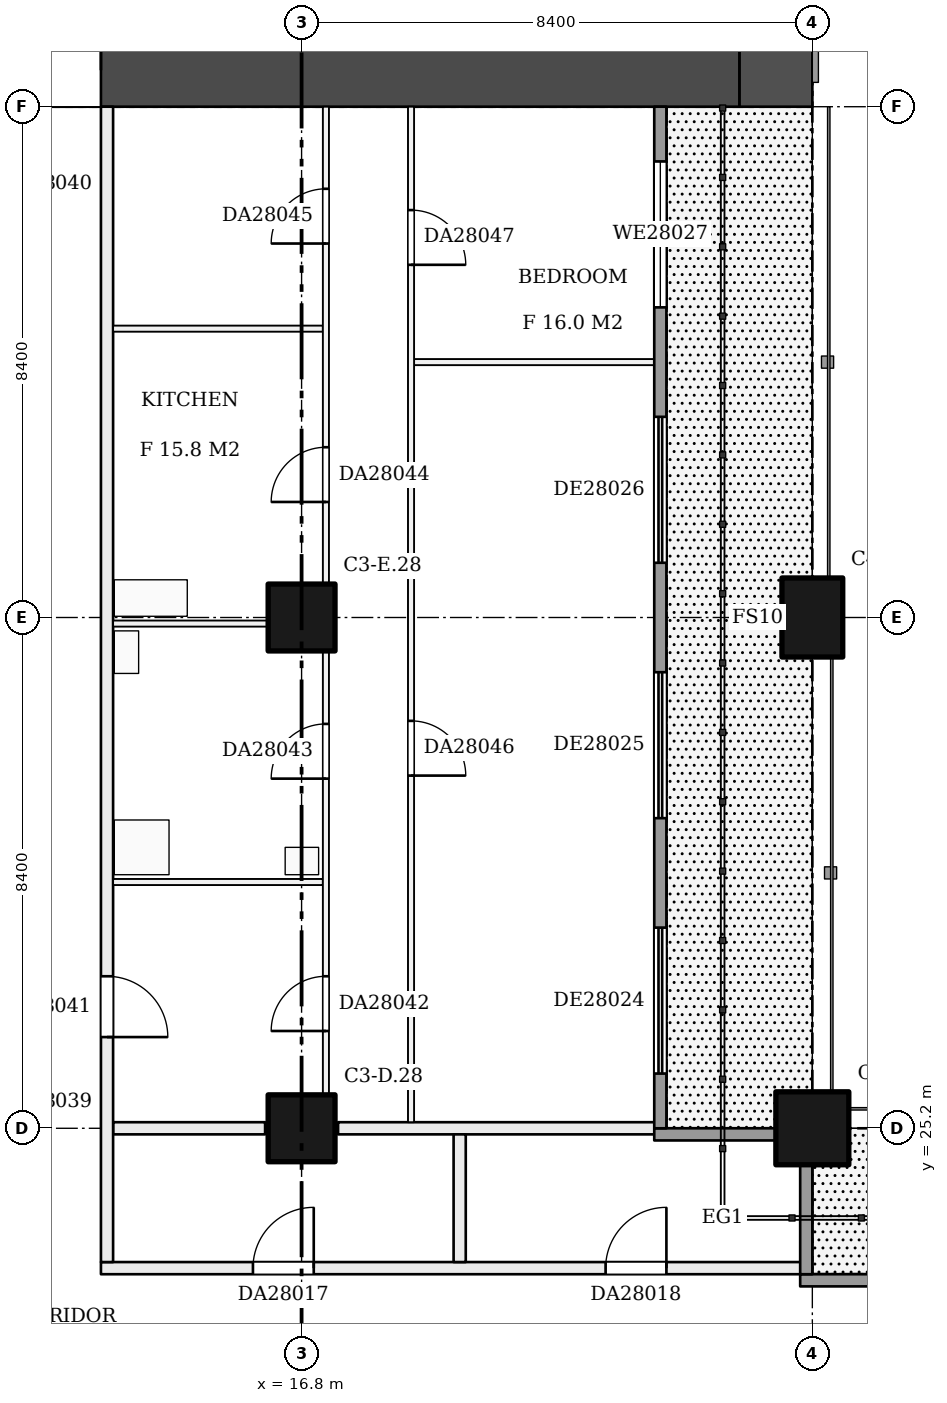
"""IFC4 building model, lengths in metres.
Left out: names, types, materials, properties, quantities, classifications, styles, units other than length and angle.
Written with IfcOpenShell. Run it as: python <this file> out.ifc"""

import sys

from ifc_helpers import new_model, si_unit, direction, frame, frame_2d, origin, origin_2d, place, context, subcontext, project, spatial, rectangle, extrude, element, fill, save


model = new_model("IFC4")
c1 = context("Model", 3, precision=1e-05, world=origin(), true_north=direction((0.0, 1.0)))
c2 = subcontext(c1, "Body", "Model", "MODEL_VIEW")
j1 = project(units=[si_unit("LENGTHUNIT", "METRE"), si_unit("PLANEANGLEUNIT", "RADIAN")], contexts=[c1])
p1 = place(None, origin())
s1 = spatial("IfcSite", under=j1, at=p1, CompositionType="ELEMENT")
p2 = place(p1, origin())
s2 = spatial("IfcBuilding", under=s1, at=p2, CompositionType="ELEMENT")
p3 = place(p2, frame((0.0, 0.0, 112.7)))
s3 = spatial("IfcBuildingStorey", under=s2, at=p3, CompositionType="ELEMENT", Elevation=112.7)
for number, where, z_axis, x_axis in (
    (1, (16.8, 25.2, 0.0), (0.0, 0.0, 1.0), (1.0, 0.0, 0.0)),
    (2, (16.8, 33.6, 0.0), (0.0, 0.0, 1.0), (1.0, 0.0, 0.0)),
):
    element("IfcColumn", number, at=place(p3, frame(where, z_axis=z_axis, x_axis=x_axis)), inside=s3, PredefinedType="COLUMN", context=c2, shape_type="SweptSolid", body=[
        extrude(rectangle(XDim=1.1, YDim=1.1, at=origin_2d()), origin(), (0.0, 0.0, 1.0), 3.22),
    ])
p4 = place(p3, frame((25.2, 25.2, 0.0), z_axis=(0.0, 0.0, 1.0), x_axis=(1.0, 0.0, 0.0)))
e3 = element("IfcColumn", 3, at=p4, inside=s3, PredefinedType="COLUMN", context=c2, shape_type="SweptSolid", body=[
    extrude(rectangle(XDim=1.2, YDim=1.2, at=origin_2d()), origin(), (0.0, 0.0, 1.0), 3.22),
])
p5 = place(p3, frame((25.2, 33.6, 0.0), z_axis=(0.0, 0.0, 1.0), x_axis=(0.0, 1.0, 0.0)))
e4 = element("IfcColumn", 4, at=p5, inside=s3, PredefinedType="COLUMN", context=c2, shape_type="SweptSolid", body=[
    extrude(rectangle(XDim=1.3, YDim=1.0, at=origin_2d()), origin(), (0.0, 0.0, 1.0), 3.22),
])
p6 = place(p3, frame((24.6, 58.8, 0.0), z_axis=(0.0, 0.0, 1.0), x_axis=(0.0, -1.0, 0.0)))
e5 = element("IfcWall", 5, at=p6, inside=s3, PredefinedType="SHEAR", context=c2, shape_type="SweptSolid", body=[
    extrude(rectangle(XDim=16.8, YDim=1.2, at=frame_2d((8.4, 0.0))), origin(), (0.0, 0.0, 1.0), 3.22),
])
p7 = place(p6, frame((1.8, 0.0, 0.5)))
e6 = element("IfcOpeningElement", 6, at=p7, cuts=e5, PredefinedType="OPENING", context=c2, shape_type="SweptSolid", body=[
    extrude(rectangle(XDim=1.8, YDim=2.4, at=frame_2d((0.9, 1.2))), frame((0.0, 0.61, 0.0), z_axis=(0.0, -1.0, 0.0), x_axis=(1.0, 0.0, 0.0)), (0.0, 0.0, 1.0), 1.22),
])
p8 = place(p6, frame((4.49, 0.0, 1.6)))
e7 = element("IfcOpeningElement", 7, at=p8, cuts=e5, PredefinedType="OPENING", context=c2, shape_type="SweptSolid", body=[
    extrude(rectangle(XDim=0.9, YDim=1.2, at=frame_2d((0.45, 0.6))), frame((0.0, 0.61, 0.0), z_axis=(0.0, -1.0, 0.0), x_axis=(1.0, 0.0, 0.0)), (0.0, 0.0, 1.0), 1.22),
])
p9 = place(p6, frame((5.71, 0.0, 1.6)))
e8 = element("IfcOpeningElement", 8, at=p9, cuts=e5, PredefinedType="OPENING", context=c2, shape_type="SweptSolid", body=[
    extrude(rectangle(XDim=1.1, YDim=1.2, at=frame_2d((0.55, 0.6))), frame((0.0, 0.61, 0.0), z_axis=(0.0, -1.0, 0.0), x_axis=(1.0, 0.0, 0.0)), (0.0, 0.0, 1.0), 1.22),
])
p10 = place(p6, frame((7.15, 0.0, 1.6)))
e9 = element("IfcOpeningElement", 9, at=p10, cuts=e5, PredefinedType="OPENING", context=c2, shape_type="SweptSolid", body=[
    extrude(rectangle(XDim=1.1, YDim=1.2, at=frame_2d((0.55, 0.6))), frame((0.0, 0.61, 0.0), z_axis=(0.0, -1.0, 0.0), x_axis=(1.0, 0.0, 0.0)), (0.0, 0.0, 1.0), 1.22),
])
p11 = place(p6, frame((12.65, 0.0, 0.6)))
e10 = element("IfcOpeningElement", 10, at=p11, cuts=e5, PredefinedType="OPENING", context=c2, shape_type="SweptSolid", body=[
    extrude(rectangle(XDim=1.0, YDim=2.1, at=frame_2d((0.5, 1.05))), frame((0.0, 0.61, 0.0), z_axis=(0.0, -1.0, 0.0), x_axis=(1.0, 0.0, 0.0)), (0.0, 0.0, 1.0), 1.22),
])
p12 = place(p6, frame((14.175, 0.0, 1.6)))
e11 = element("IfcOpeningElement", 11, at=p12, cuts=e5, PredefinedType="OPENING", context=c2, shape_type="SweptSolid", body=[
    extrude(rectangle(XDim=1.2, YDim=1.2, at=frame_2d((0.6, 0.6))), frame((0.0, 0.61, 0.0), z_axis=(0.0, -1.0, 0.0), x_axis=(1.0, 0.0, 0.0)), (0.0, 0.0, 1.0), 1.22),
])
p13 = place(p3, frame((9.6, 42.6, 0.0), z_axis=(0.0, 0.0, 1.0), x_axis=(1.0, 0.0, 0.0)))
e12 = element("IfcWall", 12, at=p13, inside=s3, PredefinedType="SHEAR", context=c2, shape_type="SweptSolid", body=[
    extrude(rectangle(XDim=14.4, YDim=1.2, at=frame_2d((7.2, 0.0))), origin(), (0.0, 0.0, 1.0), 3.22),
])
p14 = place(p13, frame((2.1, 0.0, 0.0)))
e13 = element("IfcOpeningElement", 13, at=p14, cuts=e12, PredefinedType="OPENING", context=c2, shape_type="SweptSolid", body=[
    extrude(rectangle(XDim=1.8, YDim=2.1, at=frame_2d((0.9, 1.05))), frame((0.0, 0.61, 0.0), z_axis=(0.0, -1.0, 0.0), x_axis=(1.0, 0.0, 0.0)), (0.0, 0.0, 1.0), 1.22),
])
p15 = place(p3, frame((13.5, 22.9, 0.0), z_axis=(0.0, 0.0, 1.0), x_axis=(1.0, 0.0, 0.0)))
e14 = element("IfcWall", 14, at=p15, inside=s3, PredefinedType="PARTITIONING", context=c2, shape_type="SweptSolid", body=[
    extrude(rectangle(XDim=11.6, YDim=0.2, at=frame_2d((5.8, 0.0))), origin(), (0.0, 0.0, 1.0), 3.22),
])
p16 = place(p15, frame((2.5, 0.0, 0.0)))
e15 = element("IfcOpeningElement", 15, at=p16, cuts=e14, PredefinedType="OPENING", context=c2, shape_type="SweptSolid", body=[
    extrude(rectangle(XDim=1.0, YDim=2.1, at=frame_2d((0.5, 1.05))), frame((0.0, 0.11, 0.0), z_axis=(0.0, -1.0, 0.0), x_axis=(1.0, 0.0, 0.0)), (0.0, 0.0, 1.0), 0.22),
])
p17 = place(p15, frame((8.3, 0.0, 0.0)))
e16 = element("IfcOpeningElement", 16, at=p17, cuts=e14, PredefinedType="OPENING", context=c2, shape_type="SweptSolid", body=[
    extrude(rectangle(XDim=1.0, YDim=2.1, at=frame_2d((0.5, 1.05))), frame((0.0, 0.11, 0.0), z_axis=(0.0, -1.0, 0.0), x_axis=(1.0, 0.0, 0.0)), (0.0, 0.0, 1.0), 0.22),
])
p18 = place(p3, frame((13.7, 25.2, 0.0), z_axis=(0.0, 0.0, 1.0), x_axis=(1.0, 0.0, 0.0)))
e17 = element("IfcWall", 17, at=p18, inside=s3, PredefinedType="PARTITIONING", context=c2, shape_type="SweptSolid", body=[
    extrude(rectangle(XDim=2.5, YDim=0.2, at=frame_2d((1.25, 0.0))), origin(), (0.0, 0.0, 1.0), 3.22),
])
p19 = place(p3, frame((17.4, 25.2, 0.0), z_axis=(0.0, 0.0, 1.0), x_axis=(1.0, 0.0, 0.0)))
e18 = element("IfcWall", 18, at=p19, inside=s3, PredefinedType="PARTITIONING", context=c2, shape_type="SweptSolid", body=[
    extrude(rectangle(XDim=5.3, YDim=0.2, at=frame_2d((2.65, 0.0))), origin(), (0.0, 0.0, 1.0), 3.22),
])
for number, where, z_axis, x_axis in (
    (19, (13.7, 29.25, 0.0), (0.0, 0.0, 1.0), (1.0, 0.0, 0.0)),
    (20, (13.7, 33.5, 0.0), (0.0, 0.0, 1.0), (1.0, 0.0, 0.0)),
):
    element("IfcWall", number, at=place(p3, frame(where, z_axis=z_axis, x_axis=x_axis)), inside=s3, PredefinedType="PARTITIONING", context=c2, shape_type="SweptSolid", body=[
        extrude(rectangle(XDim=3.45, YDim=0.1, at=frame_2d((1.725, 0.0))), origin(), (0.0, 0.0, 1.0), 3.22),
    ])
p20 = place(p3, frame((18.65, 37.8, 0.0), z_axis=(0.0, 0.0, 1.0), x_axis=(1.0, 0.0, 0.0)))
e21 = element("IfcWall", 21, at=p20, inside=s3, PredefinedType="PARTITIONING", context=c2, shape_type="SweptSolid", body=[
    extrude(rectangle(XDim=4.05, YDim=0.1, at=frame_2d((2.025, 0.0))), origin(), (0.0, 0.0, 1.0), 3.22),
])
p21 = place(p3, frame((13.7, 38.35, 0.0), z_axis=(0.0, 0.0, 1.0), x_axis=(1.0, 0.0, 0.0)))
e22 = element("IfcWall", 22, at=p21, inside=s3, PredefinedType="PARTITIONING", context=c2, shape_type="SweptSolid", body=[
    extrude(rectangle(XDim=3.45, YDim=0.1, at=frame_2d((1.725, 0.0))), origin(), (0.0, 0.0, 1.0), 3.22),
])
p22 = place(p3, frame((13.6, 23.0, 0.0), z_axis=(0.0, 0.0, 1.0), x_axis=(0.0, 1.0, 0.0)))
e23 = element("IfcWall", 23, at=p22, inside=s3, PredefinedType="PARTITIONING", context=c2, shape_type="SweptSolid", body=[
    extrude(rectangle(XDim=19.0, YDim=0.2, at=frame_2d((9.5, 0.0))), origin(), (0.0, 0.0, 1.0), 3.22),
])
p23 = place(p22, frame((3.7, 0.0, 0.0)))
e24 = element("IfcOpeningElement", 24, at=p23, cuts=e23, PredefinedType="OPENING", context=c2, shape_type="SweptSolid", body=[
    extrude(rectangle(XDim=1.0, YDim=2.1, at=frame_2d((0.5, 1.05))), frame((0.0, 0.11, 0.0), z_axis=(0.0, -1.0, 0.0), x_axis=(1.0, 0.0, 0.0)), (0.0, 0.0, 1.0), 0.22),
])
p24 = place(p3, frame((17.2, 25.3, 0.0), z_axis=(0.0, 0.0, 1.0), x_axis=(0.0, 1.0, 0.0)))
e25 = element("IfcWall", 25, at=p24, inside=s3, PredefinedType="PARTITIONING", context=c2, shape_type="SweptSolid", body=[
    extrude(rectangle(XDim=16.7, YDim=0.1, at=frame_2d((8.35, 0.0))), origin(), (0.0, 0.0, 1.0), 3.22),
])
p25 = place(p24, frame((1.5, 0.0, 0.0)))
e26 = element("IfcOpeningElement", 26, at=p25, cuts=e25, PredefinedType="OPENING", context=c2, shape_type="SweptSolid", body=[
    extrude(rectangle(XDim=0.9, YDim=2.1, at=frame_2d((0.45, 1.05))), frame((0.0, 0.06, 0.0), z_axis=(0.0, -1.0, 0.0), x_axis=(1.0, 0.0, 0.0)), (0.0, 0.0, 1.0), 0.12),
])
p26 = place(p24, frame((5.65, 0.0, 0.0)))
e27 = element("IfcOpeningElement", 27, at=p26, cuts=e25, PredefinedType="OPENING", context=c2, shape_type="SweptSolid", body=[
    extrude(rectangle(XDim=0.9, YDim=2.1, at=frame_2d((0.45, 1.05))), frame((0.0, 0.06, 0.0), z_axis=(0.0, -1.0, 0.0), x_axis=(1.0, 0.0, 0.0)), (0.0, 0.0, 1.0), 0.12),
])
p27 = place(p24, frame((10.2, 0.0, 0.0)))
e28 = element("IfcOpeningElement", 28, at=p27, cuts=e25, PredefinedType="OPENING", context=c2, shape_type="SweptSolid", body=[
    extrude(rectangle(XDim=0.9, YDim=2.1, at=frame_2d((0.45, 1.05))), frame((0.0, 0.06, 0.0), z_axis=(0.0, -1.0, 0.0), x_axis=(1.0, 0.0, 0.0)), (0.0, 0.0, 1.0), 0.12),
])
p28 = place(p24, frame((14.45, 0.0, 0.0)))
e29 = element("IfcOpeningElement", 29, at=p28, cuts=e25, PredefinedType="OPENING", context=c2, shape_type="SweptSolid", body=[
    extrude(rectangle(XDim=0.9, YDim=2.1, at=frame_2d((0.45, 1.05))), frame((0.0, 0.06, 0.0), z_axis=(0.0, -1.0, 0.0), x_axis=(1.0, 0.0, 0.0)), (0.0, 0.0, 1.0), 0.12),
])
p29 = place(p3, frame((18.6, 25.3, 0.0), z_axis=(0.0, 0.0, 1.0), x_axis=(0.0, 1.0, 0.0)))
e30 = element("IfcWall", 30, at=p29, inside=s3, PredefinedType="PARTITIONING", context=c2, shape_type="SweptSolid", body=[
    extrude(rectangle(XDim=16.7, YDim=0.1, at=frame_2d((8.35, 0.0))), origin(), (0.0, 0.0, 1.0), 3.22),
])
p30 = place(p29, frame((5.7, 0.0, 0.0)))
e31 = element("IfcOpeningElement", 31, at=p30, cuts=e30, PredefinedType="OPENING", context=c2, shape_type="SweptSolid", body=[
    extrude(rectangle(XDim=0.9, YDim=2.1, at=frame_2d((0.45, 1.05))), frame((0.0, 0.06, 0.0), z_axis=(0.0, -1.0, 0.0), x_axis=(1.0, 0.0, 0.0)), (0.0, 0.0, 1.0), 0.12),
])
p31 = place(p29, frame((14.1, 0.0, 0.0)))
e32 = element("IfcOpeningElement", 32, at=p31, cuts=e30, PredefinedType="OPENING", context=c2, shape_type="SweptSolid", body=[
    extrude(rectangle(XDim=0.9, YDim=2.1, at=frame_2d((0.45, 1.05))), frame((0.0, 0.06, 0.0), z_axis=(0.0, -1.0, 0.0), x_axis=(1.0, 0.0, 0.0)), (0.0, 0.0, 1.0), 0.12),
])
p32 = place(p3, frame((19.4, 23.0, 0.0), z_axis=(0.0, 0.0, 1.0), x_axis=(0.0, 1.0, 0.0)))
e33 = element("IfcWall", 33, at=p32, inside=s3, PredefinedType="PARTITIONING", context=c2, shape_type="SweptSolid", body=[
    extrude(rectangle(XDim=2.1, YDim=0.2, at=frame_2d((1.05, 0.0))), origin(), (0.0, 0.0, 1.0), 3.22),
])
p33 = place(p3, frame((42.0, 22.7, 0.0), z_axis=(0.0, 0.0, 1.0), x_axis=(-1.0, 0.0, 0.0)))
e34 = element("IfcWall", 34, at=p33, inside=s3, PredefinedType="SOLIDWALL", context=c2, shape_type="SweptSolid", body=[
    extrude(rectangle(XDim=17.0, YDim=0.2, at=frame_2d((8.5, 0.0))), origin(), (0.0, 0.0, 1.0), 3.22),
])
p34 = place(p33, frame((9.6, 0.0, 0.0)))
e35 = element("IfcOpeningElement", 35, at=p34, cuts=e34, PredefinedType="OPENING", context=c2, shape_type="SweptSolid", body=[
    extrude(rectangle(XDim=1.8, YDim=2.4, at=frame_2d((0.9, 1.2))), frame((0.0, 0.11, 0.0), z_axis=(0.0, -1.0, 0.0), x_axis=(1.0, 0.0, 0.0)), (0.0, 0.0, 1.0), 0.22),
])
p35 = place(p3, frame((25.1, 22.8, 0.0), z_axis=(0.0, 0.0, 1.0), x_axis=(0.0, 1.0, 0.0)))
e36 = element("IfcWall", 36, at=p35, inside=s3, PredefinedType="SOLIDWALL", context=c2, shape_type="SweptSolid", body=[
    extrude(rectangle(XDim=1.8, YDim=0.2, at=frame_2d((0.9, 0.0))), origin(), (0.0, 0.0, 1.0), 3.22),
])
p36 = place(p3, frame((24.6, 25.1, 0.0), z_axis=(0.0, 0.0, 1.0), x_axis=(-1.0, 0.0, 0.0)))
e37 = element("IfcWall", 37, at=p36, inside=s3, PredefinedType="SOLIDWALL", context=c2, shape_type="SweptSolid", body=[
    extrude(rectangle(XDim=2.0, YDim=0.2, at=frame_2d((1.0, 0.0))), origin(), (0.0, 0.0, 1.0), 3.22),
])
p37 = place(p3, frame((22.7, 25.2, 0.0), z_axis=(0.0, 0.0, 1.0), x_axis=(0.0, 1.0, 0.0)))
e38 = element("IfcWall", 38, at=p37, inside=s3, PredefinedType="SOLIDWALL", context=c2, shape_type="SweptSolid", body=[
    extrude(rectangle(XDim=16.8, YDim=0.2, at=frame_2d((8.4, 0.0))), origin(), (0.0, 0.0, 1.0), 3.22),
])
p38 = place(p37, frame((0.9, 0.0, 0.0)))
e39 = element("IfcOpeningElement", 39, at=p38, cuts=e38, PredefinedType="OPENING", context=c2, shape_type="SweptSolid", body=[
    extrude(rectangle(XDim=2.4, YDim=2.2, at=frame_2d((1.2, 1.1))), frame((0.0, 0.11, 0.0), z_axis=(0.0, -1.0, 0.0), x_axis=(1.0, 0.0, 0.0)), (0.0, 0.0, 1.0), 0.22),
])
p39 = place(p37, frame((5.1, 0.0, 0.0)))
e40 = element("IfcOpeningElement", 40, at=p39, cuts=e38, PredefinedType="OPENING", context=c2, shape_type="SweptSolid", body=[
    extrude(rectangle(XDim=2.4, YDim=2.2, at=frame_2d((1.2, 1.1))), frame((0.0, 0.11, 0.0), z_axis=(0.0, -1.0, 0.0), x_axis=(1.0, 0.0, 0.0)), (0.0, 0.0, 1.0), 0.22),
])
p40 = place(p37, frame((9.3, 0.0, 0.0)))
e41 = element("IfcOpeningElement", 41, at=p40, cuts=e38, PredefinedType="OPENING", context=c2, shape_type="SweptSolid", body=[
    extrude(rectangle(XDim=2.4, YDim=2.2, at=frame_2d((1.2, 1.1))), frame((0.0, 0.11, 0.0), z_axis=(0.0, -1.0, 0.0), x_axis=(1.0, 0.0, 0.0)), (0.0, 0.0, 1.0), 0.22),
])
p41 = place(p37, frame((13.5, 0.0, 0.9)))
e42 = element("IfcOpeningElement", 42, at=p41, cuts=e38, PredefinedType="OPENING", context=c2, shape_type="SweptSolid", body=[
    extrude(rectangle(XDim=2.4, YDim=1.5, at=frame_2d((1.2, 0.75))), frame((0.0, 0.11, 0.0), z_axis=(0.0, -1.0, 0.0), x_axis=(1.0, 0.0, 0.0)), (0.0, 0.0, 1.0), 0.22),
])
p42 = place(p14, origin())
e43 = element("IfcDoor", 43, at=p42, inside=s3, OperationType="DOUBLE_DOOR_SINGLE_SWING", PredefinedType="DOOR", context=c2, shape_type="SweptSolid", body=[
    extrude(rectangle(XDim=1.8, YDim=2.1, at=frame_2d((0.9, 1.05))), frame((0.0, 0.025, 0.0), z_axis=(0.0, -1.0, 0.0), x_axis=(1.0, 0.0, 0.0)), (0.0, 0.0, 1.0), 0.05),
])
fill(e13, e43)
p43 = place(p16, origin())
e44 = element("IfcDoor", 44, at=p43, inside=s3, OperationType="SINGLE_SWING_RIGHT", PredefinedType="DOOR", context=c2, shape_type="SweptSolid", body=[
    extrude(rectangle(XDim=1.0, YDim=2.1, at=frame_2d((0.5, 1.05))), frame((0.0, 0.025, 0.0), z_axis=(0.0, -1.0, 0.0), x_axis=(1.0, 0.0, 0.0)), (0.0, 0.0, 1.0), 0.05),
])
fill(e15, e44)
p44 = place(p17, origin())
e45 = element("IfcDoor", 45, at=p44, inside=s3, OperationType="SINGLE_SWING_RIGHT", PredefinedType="DOOR", context=c2, shape_type="SweptSolid", body=[
    extrude(rectangle(XDim=1.0, YDim=2.1, at=frame_2d((0.5, 1.05))), frame((0.0, 0.025, 0.0), z_axis=(0.0, -1.0, 0.0), x_axis=(1.0, 0.0, 0.0)), (0.0, 0.0, 1.0), 0.05),
])
fill(e16, e45)
p45 = place(p23, frame((1.0, 0.0, 0.0), z_axis=(0.0, 0.0, 1.0), x_axis=(-1.0, 0.0, 0.0)))
e46 = element("IfcDoor", 46, at=p45, inside=s3, OperationType="SINGLE_SWING_RIGHT", PredefinedType="DOOR", context=c2, shape_type="SweptSolid", body=[
    extrude(rectangle(XDim=1.0, YDim=2.1, at=frame_2d((0.5, 1.05))), frame((0.0, 0.025, 0.0), z_axis=(0.0, -1.0, 0.0), x_axis=(1.0, 0.0, 0.0)), (0.0, 0.0, 1.0), 0.05),
])
fill(e24, e46)
p46 = place(p25, origin())
e47 = element("IfcDoor", 47, at=p46, inside=s3, OperationType="SINGLE_SWING_LEFT", PredefinedType="DOOR", context=c2, shape_type="SweptSolid", body=[
    extrude(rectangle(XDim=0.9, YDim=2.1, at=frame_2d((0.45, 1.05))), frame((0.0, 0.025, 0.0), z_axis=(0.0, -1.0, 0.0), x_axis=(1.0, 0.0, 0.0)), (0.0, 0.0, 1.0), 0.05),
])
fill(e26, e47)
p47 = place(p26, origin())
e48 = element("IfcDoor", 48, at=p47, inside=s3, OperationType="SINGLE_SWING_LEFT", PredefinedType="DOOR", context=c2, shape_type="SweptSolid", body=[
    extrude(rectangle(XDim=0.9, YDim=2.1, at=frame_2d((0.45, 1.05))), frame((0.0, 0.025, 0.0), z_axis=(0.0, -1.0, 0.0), x_axis=(1.0, 0.0, 0.0)), (0.0, 0.0, 1.0), 0.05),
])
fill(e27, e48)
p48 = place(p27, origin())
e49 = element("IfcDoor", 49, at=p48, inside=s3, OperationType="SINGLE_SWING_LEFT", PredefinedType="DOOR", context=c2, shape_type="SweptSolid", body=[
    extrude(rectangle(XDim=0.9, YDim=2.1, at=frame_2d((0.45, 1.05))), frame((0.0, 0.025, 0.0), z_axis=(0.0, -1.0, 0.0), x_axis=(1.0, 0.0, 0.0)), (0.0, 0.0, 1.0), 0.05),
])
fill(e28, e49)
p49 = place(p28, origin())
e50 = element("IfcDoor", 50, at=p49, inside=s3, OperationType="SINGLE_SWING_LEFT", PredefinedType="DOOR", context=c2, shape_type="SweptSolid", body=[
    extrude(rectangle(XDim=0.9, YDim=2.1, at=frame_2d((0.45, 1.05))), frame((0.0, 0.025, 0.0), z_axis=(0.0, -1.0, 0.0), x_axis=(1.0, 0.0, 0.0)), (0.0, 0.0, 1.0), 0.05),
])
fill(e29, e50)
p50 = place(p30, frame((0.9, 0.0, 0.0), z_axis=(0.0, 0.0, 1.0), x_axis=(-1.0, 0.0, 0.0)))
e51 = element("IfcDoor", 51, at=p50, inside=s3, OperationType="SINGLE_SWING_RIGHT", PredefinedType="DOOR", context=c2, shape_type="SweptSolid", body=[
    extrude(rectangle(XDim=0.9, YDim=2.1, at=frame_2d((0.45, 1.05))), frame((0.0, 0.025, 0.0), z_axis=(0.0, -1.0, 0.0), x_axis=(1.0, 0.0, 0.0)), (0.0, 0.0, 1.0), 0.05),
])
fill(e31, e51)
p51 = place(p31, frame((0.9, 0.0, 0.0), z_axis=(0.0, 0.0, 1.0), x_axis=(-1.0, 0.0, 0.0)))
e52 = element("IfcDoor", 52, at=p51, inside=s3, OperationType="SINGLE_SWING_RIGHT", PredefinedType="DOOR", context=c2, shape_type="SweptSolid", body=[
    extrude(rectangle(XDim=0.9, YDim=2.1, at=frame_2d((0.45, 1.05))), frame((0.0, 0.025, 0.0), z_axis=(0.0, -1.0, 0.0), x_axis=(1.0, 0.0, 0.0)), (0.0, 0.0, 1.0), 0.05),
])
fill(e32, e52)
p52 = place(p38, origin())
e53 = element("IfcDoor", 53, at=p52, inside=s3, OperationType="DOUBLE_DOOR_SLIDING", PredefinedType="DOOR", context=c2, shape_type="SweptSolid", body=[
    extrude(rectangle(XDim=2.4, YDim=2.2, at=frame_2d((1.2, 1.1))), frame((0.0, 0.025, 0.0), z_axis=(0.0, -1.0, 0.0), x_axis=(1.0, 0.0, 0.0)), (0.0, 0.0, 1.0), 0.05),
])
fill(e39, e53)
p53 = place(p39, origin())
e54 = element("IfcDoor", 54, at=p53, inside=s3, OperationType="DOUBLE_DOOR_SLIDING", PredefinedType="DOOR", context=c2, shape_type="SweptSolid", body=[
    extrude(rectangle(XDim=2.4, YDim=2.2, at=frame_2d((1.2, 1.1))), frame((0.0, 0.025, 0.0), z_axis=(0.0, -1.0, 0.0), x_axis=(1.0, 0.0, 0.0)), (0.0, 0.0, 1.0), 0.05),
])
fill(e40, e54)
p54 = place(p40, origin())
e55 = element("IfcDoor", 55, at=p54, inside=s3, OperationType="DOUBLE_DOOR_SLIDING", PredefinedType="DOOR", context=c2, shape_type="SweptSolid", body=[
    extrude(rectangle(XDim=2.4, YDim=2.2, at=frame_2d((1.2, 1.1))), frame((0.0, 0.025, 0.0), z_axis=(0.0, -1.0, 0.0), x_axis=(1.0, 0.0, 0.0)), (0.0, 0.0, 1.0), 0.05),
])
fill(e41, e55)
p55 = place(p41, origin())
e56 = element("IfcWindow", 56, at=p55, inside=s3, PartitioningType="SINGLE_PANEL", PredefinedType="WINDOW", context=c2, shape_type="SweptSolid", body=[
    extrude(rectangle(XDim=2.4, YDim=1.5, at=frame_2d((1.2, 0.75))), frame((0.0, 0.03, 0.0), z_axis=(0.0, -1.0, 0.0), x_axis=(1.0, 0.0, 0.0)), (0.0, 0.0, 1.0), 0.06),
])
fill(e42, e56)
save(model, sys.argv[1])
